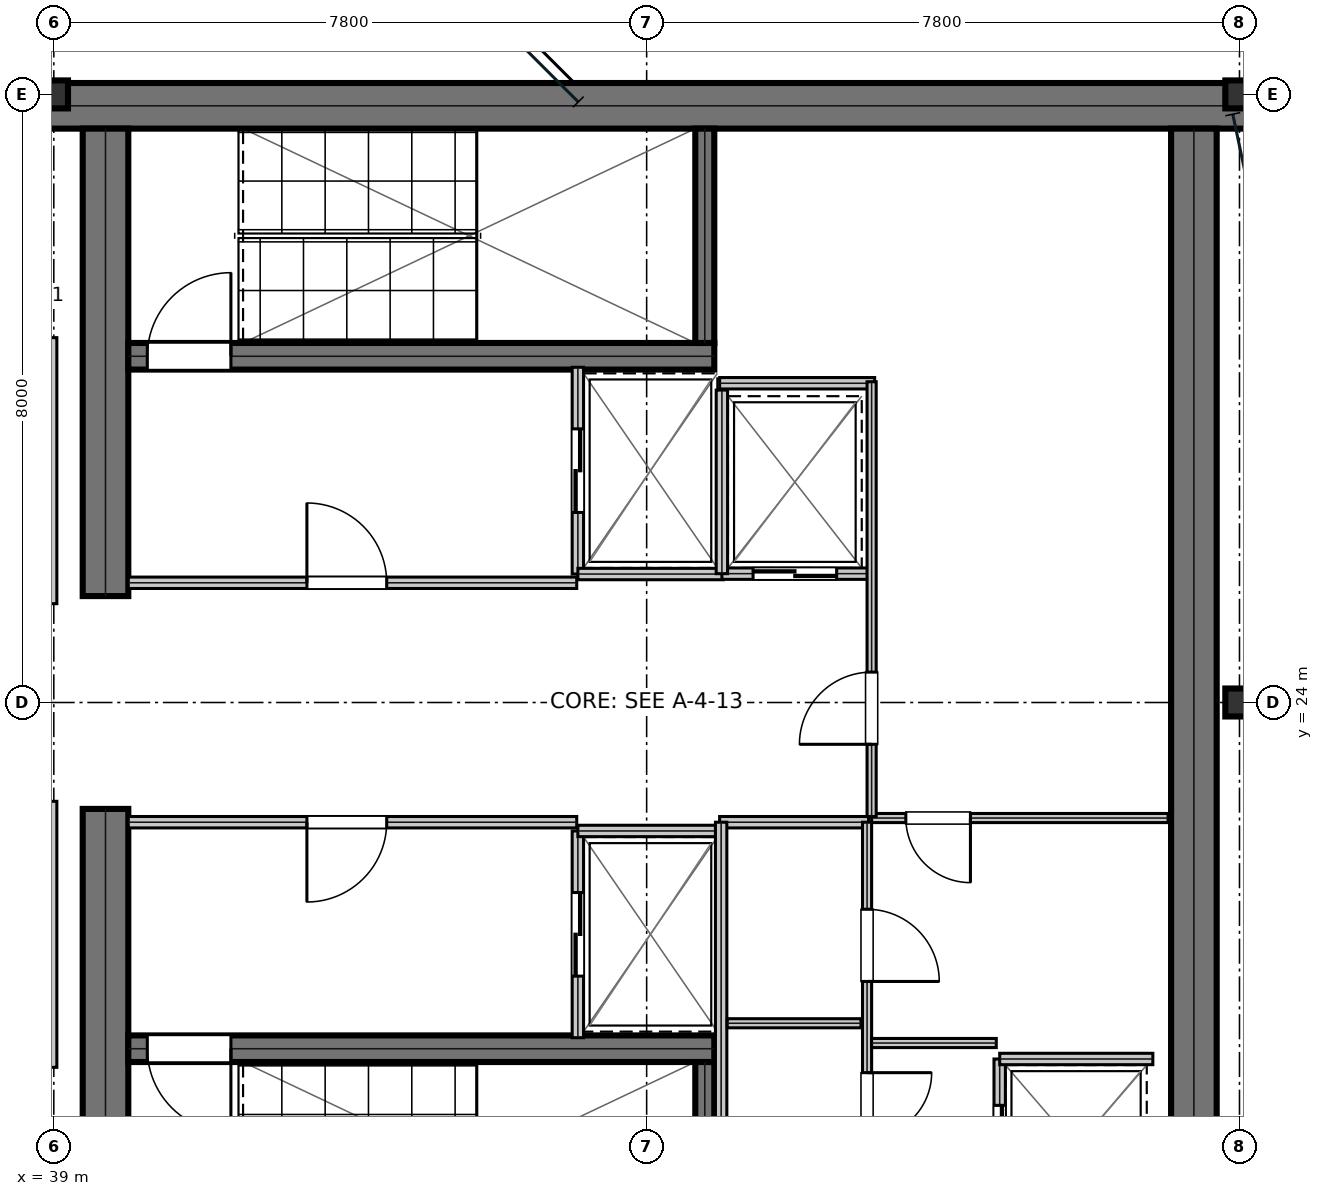
"""IFC4 building model, lengths in metres.
Left out: names, types, materials, properties, quantities, classifications, styles, units other than length and angle.
Written with IfcOpenShell. Run it as: python <this file> out.ifc"""

import sys

from ifc_helpers import new_model, si_unit, direction, frame, frame_2d, origin, origin_2d, place, context, subcontext, project, spatial, rectangle, i_section, extrude, element, fill, save


model = new_model("IFC4")
c1 = context("Model", 3, precision=1e-05, world=origin(), true_north=direction((0.0, 1.0)))
c2 = subcontext(c1, "Body", "Model", "MODEL_VIEW")
j1 = project(units=[si_unit("LENGTHUNIT", "METRE"), si_unit("PLANEANGLEUNIT", "RADIAN")], contexts=[c1])
p1 = place(None, origin())
s1 = spatial("IfcSite", under=j1, at=p1, CompositionType="ELEMENT")
p2 = place(p1, origin())
s2 = spatial("IfcBuilding", under=s1, at=p2, CompositionType="ELEMENT")
p3 = place(p2, frame((0.0, 0.0, 303.3)))
s3 = spatial("IfcBuildingStorey", under=s2, at=p3, CompositionType="ELEMENT", Elevation=303.3)
p4 = place(p3, frame((38.8, 31.85, 0.0), z_axis=(0.0, 0.0, 1.0), x_axis=(1.0, 0.0, 0.0)))
e1 = element("IfcWall", 1, at=p4, inside=s3, PredefinedType="SHEAR", context=c2, shape_type="SweptSolid", body=[
    extrude(rectangle(XDim=16.0, YDim=0.6, at=frame_2d((8.0, 0.0))), origin(), (0.0, 0.0, 1.0), 3.81),
])
for number, where, z_axis, x_axis in (
    (2, (39.68, 16.45, 0.0), (0.0, 0.0, 1.0), (0.0, 1.0, 0.0)),
    (3, (39.68, 25.4, 0.0), (0.0, 0.0, 1.0), (0.0, 1.0, 0.0)),
):
    element("IfcWall", number, at=place(p3, frame(where, z_axis=z_axis, x_axis=x_axis)), inside=s3, PredefinedType="SHEAR", context=c2, shape_type="SweptSolid", body=[
        extrude(rectangle(XDim=6.15, YDim=0.6, at=frame_2d((3.075, 0.0))), origin(), (0.0, 0.0, 1.0), 3.81),
    ])
p5 = place(p3, frame((54.0, 16.45, 0.0), z_axis=(0.0, 0.0, 1.0), x_axis=(0.0, 1.0, 0.0)))
e4 = element("IfcWall", 4, at=p5, inside=s3, PredefinedType="SHEAR", context=c2, shape_type="SweptSolid", body=[
    extrude(rectangle(XDim=15.1, YDim=0.6, at=frame_2d((7.55, 0.0))), origin(), (0.0, 0.0, 1.0), 3.81),
])
p6 = place(p3, frame((39.98, 28.555, 0.0), z_axis=(0.0, 0.0, 1.0), x_axis=(1.0, 0.0, 0.0)))
e5 = element("IfcWall", 5, at=p6, inside=s3, PredefinedType="SHEAR", context=c2, shape_type="SweptSolid", body=[
    extrude(rectangle(XDim=7.71, YDim=0.35, at=frame_2d((3.855, 0.0))), origin(), (0.0, 0.0, 1.0), 3.81),
])
p7 = place(p6, frame((0.25, 0.0, 0.0)))
e6 = element("IfcOpeningElement", 6, at=p7, cuts=e5, PredefinedType="OPENING", context=c2, shape_type="SweptSolid", body=[
    extrude(rectangle(XDim=1.1, YDim=2.15, at=frame_2d((0.55, 1.075))), frame((0.0, 0.185, 0.0), z_axis=(0.0, -1.0, 0.0), x_axis=(1.0, 0.0, 0.0)), (0.0, 0.0, 1.0), 0.37),
])
p8 = place(p3, frame((39.98, 19.445, 0.0), z_axis=(0.0, 0.0, 1.0), x_axis=(1.0, 0.0, 0.0)))
e7 = element("IfcWall", 7, at=p8, inside=s3, PredefinedType="SHEAR", context=c2, shape_type="SweptSolid", body=[
    extrude(rectangle(XDim=7.71, YDim=0.35, at=frame_2d((3.855, 0.0))), origin(), (0.0, 0.0, 1.0), 3.81),
])
p9 = place(p8, frame((0.25, 0.0, 0.0)))
e8 = element("IfcOpeningElement", 8, at=p9, cuts=e7, PredefinedType="OPENING", context=c2, shape_type="SweptSolid", body=[
    extrude(rectangle(XDim=1.1, YDim=2.15, at=frame_2d((0.55, 1.075))), frame((0.0, 0.185, 0.0), z_axis=(0.0, -1.0, 0.0), x_axis=(1.0, 0.0, 0.0)), (0.0, 0.0, 1.0), 0.37),
])
for number, where, z_axis, x_axis in (
    (9, (47.565, 28.73, 0.0), (0.0, 0.0, 1.0), (0.0, 1.0, 0.0)),
    (10, (47.565, 16.45, 0.0), (0.0, 0.0, 1.0), (0.0, 1.0, 0.0)),
):
    element("IfcWall", number, at=place(p3, frame(where, z_axis=z_axis, x_axis=x_axis)), inside=s3, PredefinedType="SHEAR", context=c2, shape_type="SweptSolid", body=[
        extrude(rectangle(XDim=2.82, YDim=0.25, at=frame_2d((1.41, 0.0))), origin(), (0.0, 0.0, 1.0), 3.81),
    ])
for number, where, z_axis, x_axis in (
    (11, (39.0, 32.0, 0.0), (0.0, 0.0, 1.0), (1.0, 0.0, 0.0)),
    (12, (54.6, 24.0, 0.0), (0.0, 0.0, 1.0), (1.0, 0.0, 0.0)),
    (13, (54.6, 32.0, 0.0), (0.0, 0.0, 1.0), (1.0, 0.0, 0.0)),
):
    element("IfcColumn", number, at=place(p3, frame(where, z_axis=z_axis, x_axis=x_axis)), inside=s3, PredefinedType="COLUMN", context=c2, shape_type="SweptSolid", body=[
        extrude(i_section(OverallWidth=0.373, OverallDepth=0.368, WebThickness=0.015, FlangeThickness=0.024, at=origin_2d()), origin(), (0.0, 0.0, 1.0), 4.044),
    ])
p10 = place(p3, frame((39.98, 25.575, 0.0), z_axis=(0.0, 0.0, 1.0), x_axis=(1.0, 0.0, 0.0)))
e14 = element("IfcWall", 14, at=p10, inside=s3, PredefinedType="PARTITIONING", context=c2, shape_type="SweptSolid", body=[
    extrude(rectangle(XDim=5.9, YDim=0.15, at=frame_2d((2.95, 0.0))), origin(), (0.0, 0.0, 1.0), 3.81),
])
p11 = place(p10, frame((2.35, 0.0, 0.0)))
e15 = element("IfcOpeningElement", 15, at=p11, cuts=e14, PredefinedType="OPENING", context=c2, shape_type="SweptSolid", body=[
    extrude(rectangle(XDim=1.05, YDim=2.15, at=frame_2d((0.525, 1.075))), frame((0.0, 0.085, 0.0), z_axis=(0.0, -1.0, 0.0), x_axis=(1.0, 0.0, 0.0)), (0.0, 0.0, 1.0), 0.17),
])
p12 = place(p3, frame((39.98, 22.425, 0.0), z_axis=(0.0, 0.0, 1.0), x_axis=(1.0, 0.0, 0.0)))
e16 = element("IfcWall", 16, at=p12, inside=s3, PredefinedType="PARTITIONING", context=c2, shape_type="SweptSolid", body=[
    extrude(rectangle(XDim=5.9, YDim=0.15, at=frame_2d((2.95, 0.0))), origin(), (0.0, 0.0, 1.0), 3.81),
])
p13 = place(p12, frame((2.35, 0.0, 0.0)))
e17 = element("IfcOpeningElement", 17, at=p13, cuts=e16, PredefinedType="OPENING", context=c2, shape_type="SweptSolid", body=[
    extrude(rectangle(XDim=1.05, YDim=2.15, at=frame_2d((0.525, 1.075))), frame((0.0, 0.085, 0.0), z_axis=(0.0, -1.0, 0.0), x_axis=(1.0, 0.0, 0.0)), (0.0, 0.0, 1.0), 0.17),
])
p14 = place(p3, frame((45.895, 25.69, 0.0), z_axis=(0.0, 0.0, 1.0), x_axis=(0.0, 1.0, 0.0)))
e18 = element("IfcWall", 18, at=p14, inside=s3, PredefinedType="PARTITIONING", context=c2, shape_type="SweptSolid", body=[
    extrude(rectangle(XDim=2.72, YDim=0.15, at=frame_2d((1.36, 0.0))), origin(), (0.0, 0.0, 1.0), 3.81),
])
p15 = place(p14, frame((0.81, 0.0, 0.0)))
e19 = element("IfcOpeningElement", 19, at=p15, cuts=e18, PredefinedType="OPENING", context=c2, shape_type="SweptSolid", body=[
    extrude(rectangle(XDim=1.1, YDim=2.15, at=frame_2d((0.55, 1.075))), frame((0.0, 0.085, 0.0), z_axis=(0.0, -1.0, 0.0), x_axis=(1.0, 0.0, 0.0)), (0.0, 0.0, 1.0), 0.17),
])
p16 = place(p3, frame((45.895, 25.69, 0.0), z_axis=(0.0, 0.0, 1.0), x_axis=(1.0, 0.0, 0.0)))
e20 = element("IfcWall", 20, at=p16, inside=s3, PredefinedType="PARTITIONING", context=c2, shape_type="SweptSolid", body=[
    extrude(rectangle(XDim=1.915, YDim=0.15, at=frame_2d((0.958, 0.0))), origin(), (0.0, 0.0, 1.0), 3.81),
])
p17 = place(p3, frame((45.895, 19.59, 0.0), z_axis=(0.0, 0.0, 1.0), x_axis=(0.0, 1.0, 0.0)))
e21 = element("IfcWall", 21, at=p17, inside=s3, PredefinedType="PARTITIONING", context=c2, shape_type="SweptSolid", body=[
    extrude(rectangle(XDim=2.72, YDim=0.15, at=frame_2d((1.36, 0.0))), origin(), (0.0, 0.0, 1.0), 3.81),
])
p18 = place(p17, frame((0.81, 0.0, 0.0)))
e22 = element("IfcOpeningElement", 22, at=p18, cuts=e21, PredefinedType="OPENING", context=c2, shape_type="SweptSolid", body=[
    extrude(rectangle(XDim=1.1, YDim=2.15, at=frame_2d((0.55, 1.075))), frame((0.0, 0.085, 0.0), z_axis=(0.0, -1.0, 0.0), x_axis=(1.0, 0.0, 0.0)), (0.0, 0.0, 1.0), 0.17),
])
p19 = place(p3, frame((45.895, 22.31, 0.0), z_axis=(0.0, 0.0, 1.0), x_axis=(1.0, 0.0, 0.0)))
e23 = element("IfcWall", 23, at=p19, inside=s3, PredefinedType="PARTITIONING", context=c2, shape_type="SweptSolid", body=[
    extrude(rectangle(XDim=1.915, YDim=0.15, at=frame_2d((0.958, 0.0))), origin(), (0.0, 0.0, 1.0), 3.81),
])
p20 = place(p3, frame((47.79, 25.695, 0.0), z_axis=(0.0, 0.0, 1.0), x_axis=(1.0, 0.0, 0.0)))
e24 = element("IfcWall", 24, at=p20, inside=s3, PredefinedType="PARTITIONING", context=c2, shape_type="SweptSolid", body=[
    extrude(rectangle(XDim=1.92, YDim=0.15, at=frame_2d((0.96, 0.0))), origin(), (0.0, 0.0, 1.0), 3.81),
])
p21 = place(p20, frame((0.41, 0.0, 0.0)))
e25 = element("IfcOpeningElement", 25, at=p21, cuts=e24, PredefinedType="OPENING", context=c2, shape_type="SweptSolid", body=[
    extrude(rectangle(XDim=1.1, YDim=2.15, at=frame_2d((0.55, 1.075))), frame((0.0, 0.085, 0.0), z_axis=(0.0, -1.0, 0.0), x_axis=(1.0, 0.0, 0.0)), (0.0, 0.0, 1.0), 0.17),
])
p22 = place(p3, frame((47.79, 25.695, 0.0), z_axis=(0.0, 0.0, 1.0), x_axis=(0.0, 1.0, 0.0)))
e26 = element("IfcWall", 26, at=p22, inside=s3, PredefinedType="PARTITIONING", context=c2, shape_type="SweptSolid", body=[
    extrude(rectangle(XDim=2.415, YDim=0.15, at=frame_2d((1.208, 0.0))), origin(), (0.0, 0.0, 1.0), 3.81),
])
p23 = place(p3, frame((51.445, 16.99, 0.0), z_axis=(0.0, 0.0, 1.0), x_axis=(0.0, 1.0, 0.0)))
e27 = element("IfcWall", 27, at=p23, inside=s3, PredefinedType="PARTITIONING", context=c2, shape_type="SweptSolid", body=[
    extrude(rectangle(XDim=2.32, YDim=0.15, at=frame_2d((1.16, 0.0))), origin(), (0.0, 0.0, 1.0), 3.81),
])
p24 = place(p23, frame((0.61, 0.0, 0.0)))
e28 = element("IfcOpeningElement", 28, at=p24, cuts=e27, PredefinedType="OPENING", context=c2, shape_type="SweptSolid", body=[
    extrude(rectangle(XDim=1.1, YDim=2.15, at=frame_2d((0.55, 1.075))), frame((0.0, 0.085, 0.0), z_axis=(0.0, -1.0, 0.0), x_axis=(1.0, 0.0, 0.0)), (0.0, 0.0, 1.0), 0.17),
])
p25 = place(p3, frame((51.445, 19.31, 0.0), z_axis=(0.0, 0.0, 1.0), x_axis=(1.0, 0.0, 0.0)))
e29 = element("IfcWall", 29, at=p25, inside=s3, PredefinedType="PARTITIONING", context=c2, shape_type="SweptSolid", body=[
    extrude(rectangle(XDim=2.015, YDim=0.15, at=frame_2d((1.007, 0.0))), origin(), (0.0, 0.0, 1.0), 3.81),
])
p26 = place(p3, frame((47.76, 22.425, 0.0), z_axis=(0.0, 0.0, 1.0), x_axis=(1.0, 0.0, 0.0)))
e30 = element("IfcWall", 30, at=p26, inside=s3, PredefinedType="PARTITIONING", context=c2, shape_type="SweptSolid", body=[
    extrude(rectangle(XDim=1.96, YDim=0.15, at=frame_2d((0.98, 0.0))), origin(), (0.0, 0.0, 1.0), 3.81),
])
p27 = place(p3, frame((47.78, 16.45, 0.0), z_axis=(0.0, 0.0, 1.0), x_axis=(0.0, 1.0, 0.0)))
e31 = element("IfcWall", 31, at=p27, inside=s3, PredefinedType="PARTITIONING", context=c2, shape_type="SweptSolid", body=[
    extrude(rectangle(XDim=5.975, YDim=0.15, at=frame_2d((2.988, 0.0))), origin(), (0.0, 0.0, 1.0), 3.81),
])
p28 = place(p3, frame((47.86, 19.78, 0.0), z_axis=(0.0, 0.0, 1.0), x_axis=(1.0, 0.0, 0.0)))
e32 = element("IfcWall", 32, at=p28, inside=s3, PredefinedType="PARTITIONING", context=c2, shape_type="SweptSolid", body=[
    extrude(rectangle(XDim=1.76, YDim=0.12, at=frame_2d((0.88, 0.0))), origin(), (0.0, 0.0, 1.0), 3.81),
])
p29 = place(p3, frame((49.7, 16.48, 0.0), z_axis=(0.0, 0.0, 1.0), x_axis=(0.0, 1.0, 0.0)))
e33 = element("IfcWall", 33, at=p29, inside=s3, PredefinedType="PARTITIONING", context=c2, shape_type="SweptSolid", body=[
    extrude(rectangle(XDim=5.945, YDim=0.12, at=frame_2d((2.973, 0.0))), origin(), (0.0, 0.0, 1.0), 3.81),
])
p30 = place(p29, frame((1.8, 0.0, 0.0)))
e34 = element("IfcOpeningElement", 34, at=p30, cuts=e33, PredefinedType="OPENING", context=c2, shape_type="SweptSolid", body=[
    extrude(rectangle(XDim=0.85, YDim=2.15, at=frame_2d((0.425, 1.075))), frame((0.0, 0.07, 0.0), z_axis=(0.0, -1.0, 0.0), x_axis=(1.0, 0.0, 0.0)), (0.0, 0.0, 1.0), 0.14),
])
p31 = place(p29, frame((3.85, 0.0, 0.0)))
e35 = element("IfcOpeningElement", 35, at=p31, cuts=e33, PredefinedType="OPENING", context=c2, shape_type="SweptSolid", body=[
    extrude(rectangle(XDim=0.95, YDim=2.15, at=frame_2d((0.475, 1.075))), frame((0.0, 0.07, 0.0), z_axis=(0.0, -1.0, 0.0), x_axis=(1.0, 0.0, 0.0)), (0.0, 0.0, 1.0), 0.14),
])
p32 = place(p3, frame((49.76, 22.48, 0.0), z_axis=(0.0, 0.0, 1.0), x_axis=(1.0, 0.0, 0.0)))
e36 = element("IfcWall", 36, at=p32, inside=s3, PredefinedType="PARTITIONING", context=c2, shape_type="SweptSolid", body=[
    extrude(rectangle(XDim=3.9, YDim=0.12, at=frame_2d((1.95, 0.0))), origin(), (0.0, 0.0, 1.0), 3.81),
])
p33 = place(p32, frame((0.45, 0.0, 0.0)))
e37 = element("IfcOpeningElement", 37, at=p33, cuts=e36, PredefinedType="OPENING", context=c2, shape_type="SweptSolid", body=[
    extrude(rectangle(XDim=0.85, YDim=2.15, at=frame_2d((0.425, 1.075))), frame((0.0, 0.07, 0.0), z_axis=(0.0, -1.0, 0.0), x_axis=(1.0, 0.0, 0.0)), (0.0, 0.0, 1.0), 0.14),
])
p34 = place(p3, frame((49.76, 19.52, 0.0), z_axis=(0.0, 0.0, 1.0), x_axis=(1.0, 0.0, 0.0)))
e38 = element("IfcWall", 38, at=p34, inside=s3, PredefinedType="PARTITIONING", context=c2, shape_type="SweptSolid", body=[
    extrude(rectangle(XDim=1.64, YDim=0.12, at=frame_2d((0.82, 0.0))), origin(), (0.0, 0.0, 1.0), 3.81),
])
p35 = place(p3, frame((47.76, 28.2, 0.0), z_axis=(0.0, 0.0, 1.0), x_axis=(1.0, 0.0, 0.0)))
e39 = element("IfcWall", 39, at=p35, inside=s3, PredefinedType="PARTITIONING", context=c2, shape_type="SweptSolid", body=[
    extrude(rectangle(XDim=2.04, YDim=0.15, at=frame_2d((1.02, 0.0))), origin(), (0.0, 0.0, 1.0), 3.81),
])
p36 = place(p3, frame((49.76, 22.5, 0.0), z_axis=(0.0, 0.0, 1.0), x_axis=(0.0, 1.0, 0.0)))
e40 = element("IfcWall", 40, at=p36, inside=s3, PredefinedType="PARTITIONING", context=c2, shape_type="SweptSolid", body=[
    extrude(rectangle(XDim=5.72, YDim=0.12, at=frame_2d((2.86, 0.0))), origin(), (0.0, 0.0, 1.0), 3.81),
])
p37 = place(p36, frame((0.95, 0.0, 0.0)))
e41 = element("IfcOpeningElement", 41, at=p37, cuts=e40, PredefinedType="OPENING", context=c2, shape_type="SweptSolid", body=[
    extrude(rectangle(XDim=0.95, YDim=2.15, at=frame_2d((0.475, 1.075))), frame((0.0, 0.07, 0.0), z_axis=(0.0, -1.0, 0.0), x_axis=(1.0, 0.0, 0.0)), (0.0, 0.0, 1.0), 0.14),
])
for number, where, z_axis, x_axis in (
    (42, (38.95, 19.2, 0.0), (0.0, 0.0, 1.0), (0.0, 1.0, 0.0)),
    (43, (38.95, 25.3, 0.0), (0.0, 0.0, 1.0), (0.0, 1.0, 0.0)),
):
    element("IfcWall", number, at=place(p3, frame(where, z_axis=z_axis, x_axis=x_axis)), inside=s3, PredefinedType="SOLIDWALL", context=c2, shape_type="SweptSolid", body=[
        extrude(rectangle(XDim=3.5, YDim=0.18, at=frame_2d((1.75, 0.0))), origin(), (0.0, 0.0, 1.0), 3.54),
    ])
p38 = place(p11, origin())
e44 = element("IfcDoor", 44, at=p38, inside=s3, OperationType="SINGLE_SWING_LEFT", PredefinedType="DOOR", context=c2, shape_type="SweptSolid", body=[
    extrude(rectangle(XDim=1.05, YDim=2.15, at=frame_2d((0.525, 1.075))), frame((0.0, 0.025, 0.0), z_axis=(0.0, -1.0, 0.0), x_axis=(1.0, 0.0, 0.0)), (0.0, 0.0, 1.0), 0.05),
])
fill(e15, e44)
p39 = place(p13, frame((1.05, 0.0, 0.0), z_axis=(0.0, 0.0, 1.0), x_axis=(-1.0, 0.0, 0.0)))
e45 = element("IfcDoor", 45, at=p39, inside=s3, OperationType="SINGLE_SWING_RIGHT", PredefinedType="DOOR", context=c2, shape_type="SweptSolid", body=[
    extrude(rectangle(XDim=1.05, YDim=2.15, at=frame_2d((0.525, 1.075))), frame((0.0, 0.025, 0.0), z_axis=(0.0, -1.0, 0.0), x_axis=(1.0, 0.0, 0.0)), (0.0, 0.0, 1.0), 0.05),
])
fill(e17, e45)
p40 = place(p15, frame((1.1, 0.0, 0.0), z_axis=(0.0, 0.0, 1.0), x_axis=(-1.0, 0.0, 0.0)))
e46 = element("IfcDoor", 46, at=p40, inside=s3, OperationType="DOUBLE_DOOR_SLIDING", PredefinedType="DOOR", context=c2, shape_type="SweptSolid", body=[
    extrude(rectangle(XDim=1.1, YDim=2.15, at=frame_2d((0.55, 1.075))), frame((0.0, 0.025, 0.0), z_axis=(0.0, -1.0, 0.0), x_axis=(1.0, 0.0, 0.0)), (0.0, 0.0, 1.0), 0.05),
])
fill(e19, e46)
p41 = place(p18, frame((1.1, 0.0, 0.0), z_axis=(0.0, 0.0, 1.0), x_axis=(-1.0, 0.0, 0.0)))
e47 = element("IfcDoor", 47, at=p41, inside=s3, OperationType="DOUBLE_DOOR_SLIDING", PredefinedType="DOOR", context=c2, shape_type="SweptSolid", body=[
    extrude(rectangle(XDim=1.1, YDim=2.15, at=frame_2d((0.55, 1.075))), frame((0.0, 0.025, 0.0), z_axis=(0.0, -1.0, 0.0), x_axis=(1.0, 0.0, 0.0)), (0.0, 0.0, 1.0), 0.05),
])
fill(e22, e47)
p42 = place(p21, frame((1.1, 0.0, 0.0), z_axis=(0.0, 0.0, 1.0), x_axis=(-1.0, 0.0, 0.0)))
e48 = element("IfcDoor", 48, at=p42, inside=s3, OperationType="DOUBLE_DOOR_SLIDING", PredefinedType="DOOR", context=c2, shape_type="SweptSolid", body=[
    extrude(rectangle(XDim=1.1, YDim=2.15, at=frame_2d((0.55, 1.075))), frame((0.0, 0.025, 0.0), z_axis=(0.0, -1.0, 0.0), x_axis=(1.0, 0.0, 0.0)), (0.0, 0.0, 1.0), 0.05),
])
fill(e25, e48)
p43 = place(p24, frame((1.1, 0.0, 0.0), z_axis=(0.0, 0.0, 1.0), x_axis=(-1.0, 0.0, 0.0)))
e49 = element("IfcDoor", 49, at=p43, inside=s3, OperationType="DOUBLE_DOOR_SLIDING", PredefinedType="DOOR", context=c2, shape_type="SweptSolid", body=[
    extrude(rectangle(XDim=1.1, YDim=2.15, at=frame_2d((0.55, 1.075))), frame((0.0, 0.025, 0.0), z_axis=(0.0, -1.0, 0.0), x_axis=(1.0, 0.0, 0.0)), (0.0, 0.0, 1.0), 0.05),
])
fill(e28, e49)
p44 = place(p30, frame((0.85, 0.0, 0.0), z_axis=(0.0, 0.0, 1.0), x_axis=(-1.0, 0.0, 0.0)))
e50 = element("IfcDoor", 50, at=p44, inside=s3, OperationType="SINGLE_SWING_LEFT", PredefinedType="DOOR", context=c2, shape_type="SweptSolid", body=[
    extrude(rectangle(XDim=0.85, YDim=2.15, at=frame_2d((0.425, 1.075))), frame((0.0, 0.025, 0.0), z_axis=(0.0, -1.0, 0.0), x_axis=(1.0, 0.0, 0.0)), (0.0, 0.0, 1.0), 0.05),
])
fill(e34, e50)
p45 = place(p31, frame((0.95, 0.0, 0.0), z_axis=(0.0, 0.0, 1.0), x_axis=(-1.0, 0.0, 0.0)))
e51 = element("IfcDoor", 51, at=p45, inside=s3, OperationType="SINGLE_SWING_RIGHT", PredefinedType="DOOR", context=c2, shape_type="SweptSolid", body=[
    extrude(rectangle(XDim=0.95, YDim=2.15, at=frame_2d((0.475, 1.075))), frame((0.0, 0.025, 0.0), z_axis=(0.0, -1.0, 0.0), x_axis=(1.0, 0.0, 0.0)), (0.0, 0.0, 1.0), 0.05),
])
fill(e35, e51)
p46 = place(p33, frame((0.85, 0.0, 0.0), z_axis=(0.0, 0.0, 1.0), x_axis=(-1.0, 0.0, 0.0)))
e52 = element("IfcDoor", 52, at=p46, inside=s3, OperationType="SINGLE_SWING_LEFT", PredefinedType="DOOR", context=c2, shape_type="SweptSolid", body=[
    extrude(rectangle(XDim=0.85, YDim=2.15, at=frame_2d((0.425, 1.075))), frame((0.0, 0.025, 0.0), z_axis=(0.0, -1.0, 0.0), x_axis=(1.0, 0.0, 0.0)), (0.0, 0.0, 1.0), 0.05),
])
fill(e37, e52)
p47 = place(p37, origin())
e53 = element("IfcDoor", 53, at=p47, inside=s3, OperationType="SINGLE_SWING_LEFT", PredefinedType="DOOR", context=c2, shape_type="SweptSolid", body=[
    extrude(rectangle(XDim=0.95, YDim=2.15, at=frame_2d((0.475, 1.075))), frame((0.0, 0.025, 0.0), z_axis=(0.0, -1.0, 0.0), x_axis=(1.0, 0.0, 0.0)), (0.0, 0.0, 1.0), 0.05),
])
fill(e41, e53)
p48 = place(p7, origin())
e54 = element("IfcDoor", 54, at=p48, inside=s3, OperationType="SINGLE_SWING_RIGHT", PredefinedType="DOOR", context=c2, shape_type="SweptSolid", body=[
    extrude(rectangle(XDim=1.1, YDim=2.15, at=frame_2d((0.55, 1.075))), frame((0.0, 0.025, 0.0), z_axis=(0.0, -1.0, 0.0), x_axis=(1.0, 0.0, 0.0)), (0.0, 0.0, 1.0), 0.05),
])
fill(e6, e54)
p49 = place(p9, frame((1.1, 0.0, 0.0), z_axis=(0.0, 0.0, 1.0), x_axis=(-1.0, 0.0, 0.0)))
e55 = element("IfcDoor", 55, at=p49, inside=s3, OperationType="SINGLE_SWING_LEFT", PredefinedType="DOOR", context=c2, shape_type="SweptSolid", body=[
    extrude(rectangle(XDim=1.1, YDim=2.15, at=frame_2d((0.55, 1.075))), frame((0.0, 0.025, 0.0), z_axis=(0.0, -1.0, 0.0), x_axis=(1.0, 0.0, 0.0)), (0.0, 0.0, 1.0), 0.05),
])
fill(e8, e55)
save(model, sys.argv[1])
